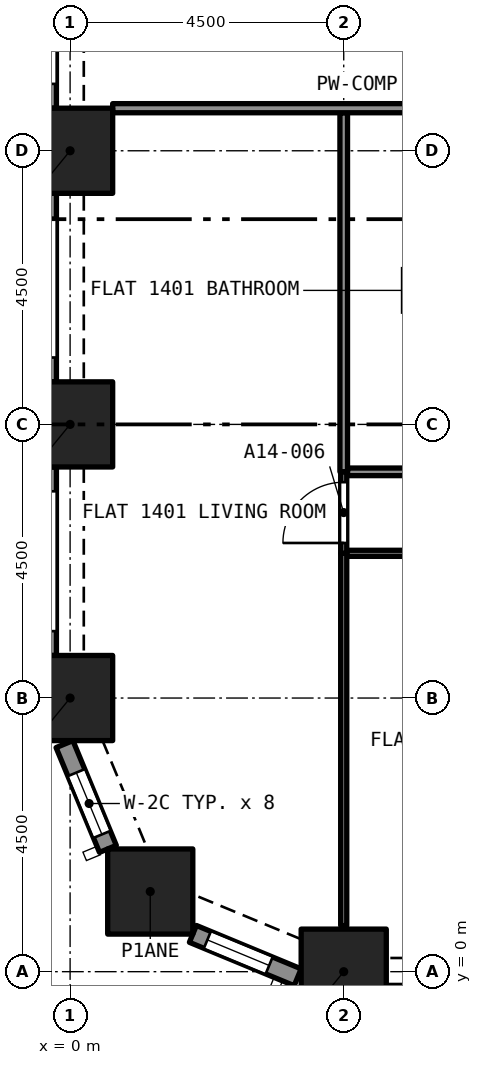
"""IFC4 building model, lengths in metres.
Left out: names, types, materials, properties, quantities, classifications, styles, units other than length and angle.
Written with IfcOpenShell. Run it as: python <this file> out.ifc"""

import sys

from ifc_helpers import new_model, si_unit, direction, frame, frame_2d, origin, origin_2d, place, context, subcontext, project, spatial, rectangle, extrude, element, fill, save


model = new_model("IFC4")
c1 = context("Model", 3, precision=1e-05, world=origin(), true_north=direction((0.0, 1.0)))
c2 = subcontext(c1, "Body", "Model", "MODEL_VIEW")
j1 = project(units=[si_unit("LENGTHUNIT", "METRE"), si_unit("PLANEANGLEUNIT", "RADIAN")], contexts=[c1])
p1 = place(None, origin())
s1 = spatial("IfcSite", under=j1, at=p1, CompositionType="ELEMENT")
p2 = place(p1, origin())
s2 = spatial("IfcBuilding", under=s1, at=p2, CompositionType="ELEMENT")
p3 = place(p2, frame((0.0, 0.0, 56.0)))
s3 = spatial("IfcBuildingStorey", under=s2, at=p3, CompositionType="ELEMENT", Elevation=56.0)
for number, where, z_axis, x_axis in (
    (1, (4.5, 0.0, 0.0), (0.0, 0.0, 1.0), (1.0, 0.0, 0.0)),
    (2, (1.318, 1.318, 0.0), (0.0, 0.0, 1.0), (1.0, 0.0, 0.0)),
    (3, (0.0, 4.5, 0.0), (0.0, 0.0, 1.0), (1.0, 0.0, 0.0)),
    (4, (0.0, 9.0, 0.0), (0.0, 0.0, 1.0), (1.0, 0.0, 0.0)),
    (5, (0.0, 13.5, 0.0), (0.0, 0.0, 1.0), (1.0, 0.0, 0.0)),
):
    element("IfcColumn", number, at=place(p3, frame(where, z_axis=z_axis, x_axis=x_axis)), inside=s3, PredefinedType="COLUMN", context=c2, shape_type="SweptSolid", body=[
        extrude(rectangle(XDim=1.4, YDim=1.4, at=origin_2d()), origin(), (0.0, 0.0, 1.0), 3.2),
    ])
p4 = place(p3, frame((0.622, 2.02, 0.0), z_axis=(0.0, 0.0, 1.0), x_axis=(-0.38262540684, 0.923903565336, 0.0)))
e6 = element("IfcWall", 6, at=p4, inside=s3, PredefinedType="SOLIDWALL", context=c2, shape_type="SweptSolid", body=[
    extrude(rectangle(XDim=1.865, YDim=0.3, at=frame_2d((0.933, 0.0))), origin(), (0.0, 0.0, 1.0), 3.2),
])
p5 = place(p4, frame((0.258, 0.0, 0.45)))
e7 = element("IfcOpeningElement", 7, at=p5, cuts=e6, PredefinedType="OPENING", context=c2, shape_type="SweptSolid", body=[
    extrude(rectangle(XDim=1.1, YDim=1.95, at=frame_2d((0.55, 0.975))), frame((0.0, 0.16, 0.0), z_axis=(0.0, -1.0, 0.0), x_axis=(1.0, 0.0, 0.0)), (0.0, 0.0, 1.0), 0.32),
])
p6 = place(p3, frame((3.743, -0.092, 0.0), z_axis=(0.0, 0.0, 1.0), x_axis=(-0.923857286003, 0.382737135771, 0.0)))
e8 = element("IfcWall", 8, at=p6, inside=s3, PredefinedType="SOLIDWALL", context=c2, shape_type="SweptSolid", body=[
    extrude(rectangle(XDim=1.865, YDim=0.3, at=frame_2d((0.933, 0.0))), origin(), (0.0, 0.0, 1.0), 3.2),
])
p7 = place(p6, frame((0.508, 0.0, 0.45)))
e9 = element("IfcOpeningElement", 9, at=p7, cuts=e8, PredefinedType="OPENING", context=c2, shape_type="SweptSolid", body=[
    extrude(rectangle(XDim=1.1, YDim=1.95, at=frame_2d((0.55, 0.975))), frame((0.0, 0.16, 0.0), z_axis=(0.0, -1.0, 0.0), x_axis=(1.0, 0.0, 0.0)), (0.0, 0.0, 1.0), 0.32),
])
p8 = place(p3, frame((-0.375, 14.2, 0.0), z_axis=(0.0, 0.0, 1.0), x_axis=(0.0, 1.0, 0.0)))
e10 = element("IfcWall", 10, at=p8, inside=s3, PredefinedType="SOLIDWALL", context=c2, shape_type="SweptSolid", body=[
    extrude(rectangle(XDim=3.1, YDim=0.3, at=frame_2d((1.55, 0.0))), origin(), (0.0, 0.0, 1.0), 3.2),
])
p9 = place(p8, frame((0.4, 0.0, 0.45)))
e11 = element("IfcOpeningElement", 11, at=p9, cuts=e10, PredefinedType="OPENING", context=c2, shape_type="SweptSolid", body=[
    extrude(rectangle(XDim=2.3, YDim=1.95, at=frame_2d((1.15, 0.975))), frame((0.0, 0.16, 0.0), z_axis=(0.0, -1.0, 0.0), x_axis=(1.0, 0.0, 0.0)), (0.0, 0.0, 1.0), 0.32),
])
p10 = place(p3, frame((-0.375, 9.7, 0.0), z_axis=(0.0, 0.0, 1.0), x_axis=(0.0, 1.0, 0.0)))
e12 = element("IfcWall", 12, at=p10, inside=s3, PredefinedType="SOLIDWALL", context=c2, shape_type="SweptSolid", body=[
    extrude(rectangle(XDim=3.1, YDim=0.3, at=frame_2d((1.55, 0.0))), origin(), (0.0, 0.0, 1.0), 3.2),
])
p11 = place(p10, frame((0.4, 0.0, 0.45)))
e13 = element("IfcOpeningElement", 13, at=p11, cuts=e12, PredefinedType="OPENING", context=c2, shape_type="SweptSolid", body=[
    extrude(rectangle(XDim=2.3, YDim=1.95, at=frame_2d((1.15, 0.975))), frame((0.0, 0.16, 0.0), z_axis=(0.0, -1.0, 0.0), x_axis=(1.0, 0.0, 0.0)), (0.0, 0.0, 1.0), 0.32),
])
p12 = place(p3, frame((-0.375, 5.2, 0.0), z_axis=(0.0, 0.0, 1.0), x_axis=(0.0, 1.0, 0.0)))
e14 = element("IfcWall", 14, at=p12, inside=s3, PredefinedType="SOLIDWALL", context=c2, shape_type="SweptSolid", body=[
    extrude(rectangle(XDim=3.1, YDim=0.3, at=frame_2d((1.55, 0.0))), origin(), (0.0, 0.0, 1.0), 3.2),
])
p13 = place(p12, frame((0.4, 0.0, 0.45)))
e15 = element("IfcOpeningElement", 15, at=p13, cuts=e14, PredefinedType="OPENING", context=c2, shape_type="SweptSolid", body=[
    extrude(rectangle(XDim=2.3, YDim=1.95, at=frame_2d((1.15, 0.975))), frame((0.0, 0.16, 0.0), z_axis=(0.0, -1.0, 0.0), x_axis=(1.0, 0.0, 0.0)), (0.0, 0.0, 1.0), 0.32),
])
p14 = place(p3, frame((4.562, 8.22, 0.0), z_axis=(0.0, 0.0, 1.0), x_axis=(1.0, 0.0, 0.0)))
e16 = element("IfcWall", 16, at=p14, inside=s3, PredefinedType="PARTITIONING", context=c2, shape_type="SweptSolid", body=[
    extrude(rectangle(XDim=3.536, YDim=0.125, at=frame_2d((1.768, 0.0))), origin(), (0.0, 0.0, 1.0), 2.9),
])
p15 = place(p14, frame((1.337, 0.0, 0.0)))
e17 = element("IfcOpeningElement", 17, at=p15, cuts=e16, PredefinedType="OPENING", context=c2, shape_type="SweptSolid", body=[
    extrude(rectangle(XDim=0.8, YDim=2.1, at=frame_2d((0.4, 1.05))), frame((0.0, 0.073, 0.0), z_axis=(0.0, -1.0, 0.0), x_axis=(1.0, 0.0, 0.0)), (0.0, 0.0, 1.0), 0.145),
])
p16 = place(p3, frame((4.5, 8.22, 0.0), z_axis=(0.0, 0.0, 1.0), x_axis=(0.0, 1.0, 0.0)))
e18 = element("IfcWall", 18, at=p16, inside=s3, PredefinedType="PARTITIONING", context=c2, shape_type="SweptSolid", body=[
    extrude(rectangle(XDim=5.905, YDim=0.125, at=frame_2d((2.953, 0.0))), origin(), (0.0, 0.0, 1.0), 2.9),
])
p17 = place(p3, frame((9.0, 6.88, 0.0), z_axis=(0.0, 0.0, 1.0), x_axis=(-1.0, 0.0, 0.0)))
e19 = element("IfcWall", 19, at=p17, inside=s3, PredefinedType="PARTITIONING", context=c2, shape_type="SweptSolid", body=[
    extrude(rectangle(XDim=4.45, YDim=0.1, at=frame_2d((2.225, 0.0))), origin(), (0.0, 0.0, 1.0), 2.9),
])
p18 = place(p17, frame((1.8, 0.0, 0.0)))
e20 = element("IfcOpeningElement", 20, at=p18, cuts=e19, PredefinedType="OPENING", context=c2, shape_type="SweptSolid", body=[
    extrude(rectangle(XDim=0.9, YDim=2.1, at=frame_2d((0.45, 1.05))), frame((0.0, 0.06, 0.0), z_axis=(0.0, -1.0, 0.0), x_axis=(1.0, 0.0, 0.0)), (0.0, 0.0, 1.0), 0.12),
])
p19 = place(p3, frame((4.5, 0.758, 0.0), z_axis=(0.0, 0.0, 1.0), x_axis=(0.0, 1.0, 0.0)))
e21 = element("IfcWall", 21, at=p19, inside=s3, PredefinedType="PARTITIONING", context=c2, shape_type="SweptSolid", body=[
    extrude(rectangle(XDim=6.122, YDim=0.1, at=frame_2d((3.061, 0.0))), origin(), (0.0, 0.0, 1.0), 2.9),
])
p20 = place(p3, frame((4.5, 6.88, 0.0), z_axis=(0.0, 0.0, 1.0), x_axis=(0.0, 1.0, 0.0)))
e22 = element("IfcWall", 22, at=p20, inside=s3, PredefinedType="PARTITIONING", context=c2, shape_type="SweptSolid", body=[
    extrude(rectangle(XDim=1.34, YDim=0.1, at=frame_2d((0.67, 0.0))), origin(), (0.0, 0.0, 1.0), 2.9),
])
p21 = place(p20, frame((0.17, 0.0, 0.0)))
e23 = element("IfcOpeningElement", 23, at=p21, cuts=e22, PredefinedType="OPENING", context=c2, shape_type="SweptSolid", body=[
    extrude(rectangle(XDim=1.0, YDim=2.1, at=frame_2d((0.5, 1.05))), frame((0.0, 0.06, 0.0), z_axis=(0.0, -1.0, 0.0), x_axis=(1.0, 0.0, 0.0)), (0.0, 0.0, 1.0), 0.12),
])
p22 = place(p3, frame((0.7, 14.2, 0.0), z_axis=(0.0, 0.0, 1.0), x_axis=(1.0, 0.0, 0.0)))
e24 = element("IfcWall", 24, at=p22, inside=s3, PredefinedType="PARTITIONING", context=c2, shape_type="SweptSolid", body=[
    extrude(rectangle(XDim=9.95, YDim=0.15, at=frame_2d((4.975, 0.0))), origin(), (0.0, 0.0, 1.0), 2.9),
])
p23 = place(p5, origin())
e25 = element("IfcWindow", 25, at=p23, inside=s3, PartitioningType="SINGLE_PANEL", PredefinedType="WINDOW", context=c2, shape_type="SweptSolid", body=[
    extrude(rectangle(XDim=1.1, YDim=1.95, at=frame_2d((0.55, 0.975))), frame((0.0, 0.03, 0.0), z_axis=(0.0, -1.0, 0.0), x_axis=(1.0, 0.0, 0.0)), (0.0, 0.0, 1.0), 0.06),
])
fill(e7, e25)
p24 = place(p7, origin())
e26 = element("IfcWindow", 26, at=p24, inside=s3, PartitioningType="SINGLE_PANEL", PredefinedType="WINDOW", context=c2, shape_type="SweptSolid", body=[
    extrude(rectangle(XDim=1.1, YDim=1.95, at=frame_2d((0.55, 0.975))), frame((0.0, 0.03, 0.0), z_axis=(0.0, -1.0, 0.0), x_axis=(1.0, 0.0, 0.0)), (0.0, 0.0, 1.0), 0.06),
])
fill(e9, e26)
p25 = place(p21, origin())
e27 = element("IfcDoor", 27, at=p25, inside=s3, OperationType="SINGLE_SWING_LEFT", PredefinedType="DOOR", context=c2, shape_type="SweptSolid", body=[
    extrude(rectangle(XDim=1.0, YDim=2.1, at=frame_2d((0.5, 1.05))), frame((0.0, 0.025, 0.0), z_axis=(0.0, -1.0, 0.0), x_axis=(1.0, 0.0, 0.0)), (0.0, 0.0, 1.0), 0.05),
])
fill(e23, e27)
save(model, sys.argv[1])
